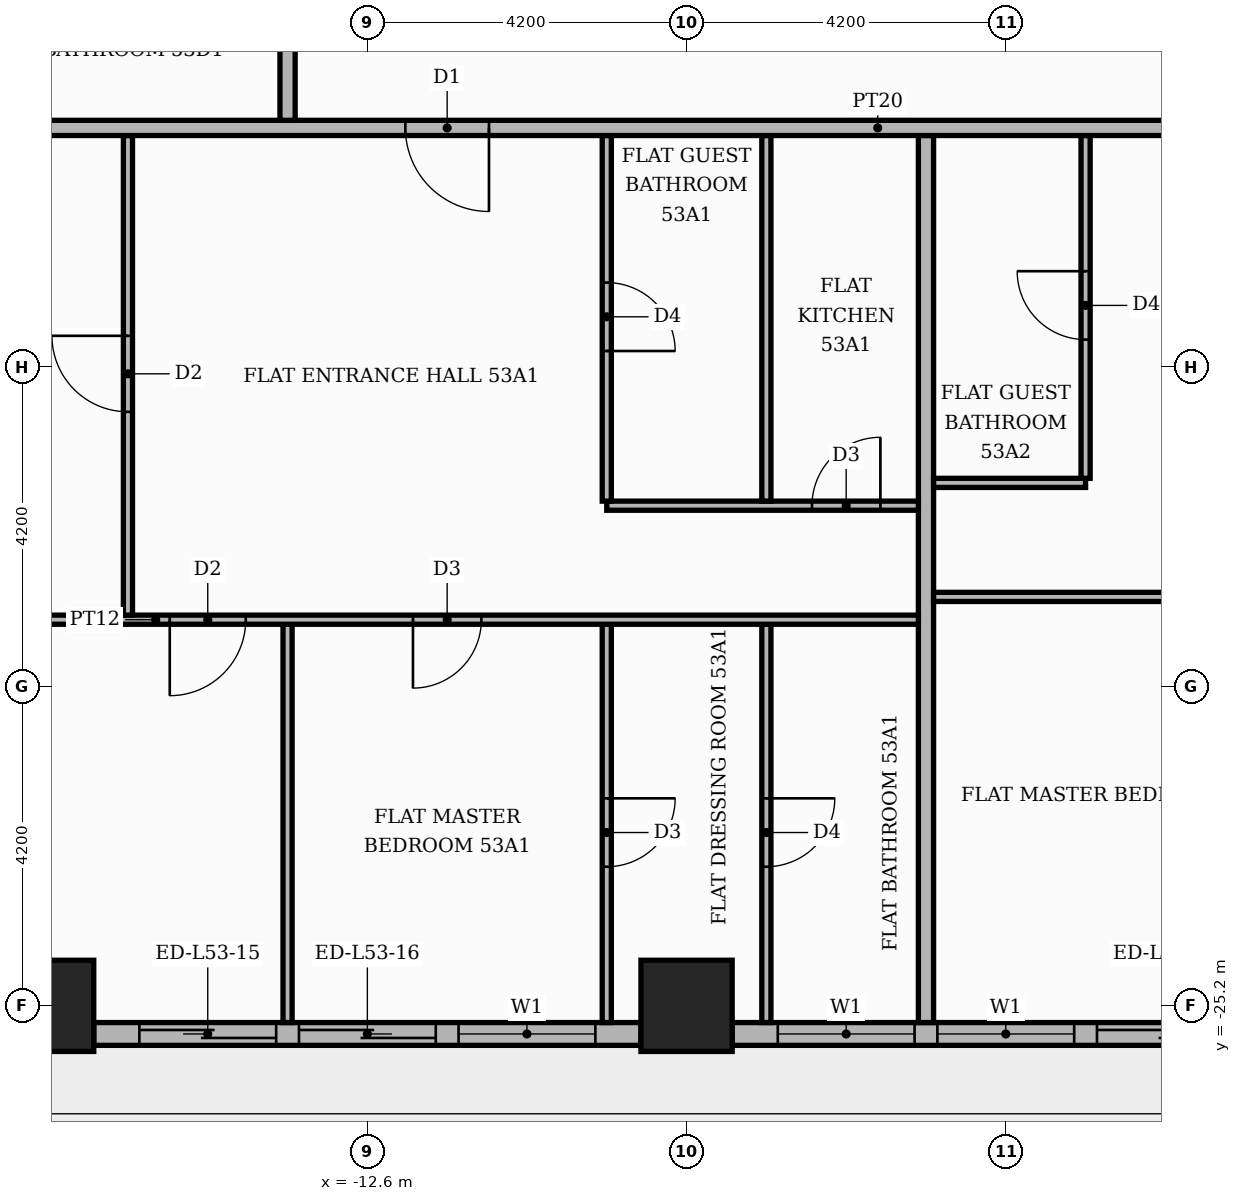
"""IFC4 building model, lengths in metres.
Left out: names, types, materials, properties, quantities, classifications, styles, units other than length and angle.
Written with IfcOpenShell. Run it as: python <this file> out.ifc"""

import sys

from ifc_helpers import new_model, si_unit, direction, frame, frame_2d, origin, origin_2d, place, context, subcontext, project, spatial, rectangle, extrude, element, fill, save


model = new_model("IFC4")
c1 = context("Model", 3, precision=1e-05, world=origin(), true_north=direction((0.0, 1.0)))
c2 = subcontext(c1, "Body", "Model", "MODEL_VIEW")
j1 = project(units=[si_unit("LENGTHUNIT", "METRE"), si_unit("PLANEANGLEUNIT", "RADIAN")], contexts=[c1])
p1 = place(None, origin())
s1 = spatial("IfcSite", under=j1, at=p1, CompositionType="ELEMENT")
p2 = place(p1, origin())
s2 = spatial("IfcBuilding", under=s1, at=p2, CompositionType="ELEMENT")
p3 = place(p2, frame((0.0, 0.0, 223.5)))
s3 = spatial("IfcBuildingStorey", under=s2, at=p3, CompositionType="ELEMENT", Elevation=223.5)
for number, where, z_axis, x_axis in (
    (1, (-8.4, -25.2, 0.0), (0.0, 0.0, 1.0), (1.0, 0.0, 0.0)),
    (2, (-16.8, -25.2, 0.0), (0.0, 0.0, 1.0), (1.0, 0.0, 0.0)),
):
    element("IfcColumn", number, at=place(p3, frame(where, z_axis=z_axis, x_axis=x_axis)), inside=s3, PredefinedType="COLUMN", context=c2, shape_type="SweptSolid", body=[
        extrude(rectangle(XDim=1.2, YDim=1.2, at=origin_2d()), origin(), (0.0, 0.0, 1.0), 3.9),
    ])
p4 = place(p3, frame((-16.2, -25.57, 0.0), z_axis=(0.0, 0.0, 1.0), x_axis=(1.0, 0.0, 0.0)))
e3 = element("IfcWall", 3, at=p4, inside=s3, PredefinedType="STANDARD", context=c2, shape_type="SweptSolid", body=[
    extrude(rectangle(XDim=7.2, YDim=0.3, at=frame_2d((3.6, 0.0))), origin(), (0.0, 0.0, 1.0), 3.48),
])
p5 = place(p4, frame((0.6, 0.0, 0.0)))
e4 = element("IfcOpeningElement", 4, at=p5, cuts=e3, PredefinedType="OPENING", context=c2, shape_type="SweptSolid", body=[
    extrude(rectangle(XDim=1.8, YDim=2.4, at=frame_2d((0.9, 1.2))), frame((0.0, 0.16, 0.0), z_axis=(0.0, -1.0, 0.0), x_axis=(1.0, 0.0, 0.0)), (0.0, 0.0, 1.0), 0.32),
])
p6 = place(p4, frame((2.7, 0.0, 0.0)))
e5 = element("IfcOpeningElement", 5, at=p6, cuts=e3, PredefinedType="OPENING", context=c2, shape_type="SweptSolid", body=[
    extrude(rectangle(XDim=1.8, YDim=2.4, at=frame_2d((0.9, 1.2))), frame((0.0, 0.16, 0.0), z_axis=(0.0, -1.0, 0.0), x_axis=(1.0, 0.0, 0.0)), (0.0, 0.0, 1.0), 0.32),
])
p7 = place(p4, frame((4.8, 0.0, 0.9)))
e6 = element("IfcOpeningElement", 6, at=p7, cuts=e3, PredefinedType="OPENING", context=c2, shape_type="SweptSolid", body=[
    extrude(rectangle(XDim=1.8, YDim=2.1, at=frame_2d((0.9, 1.05))), frame((0.0, 0.16, 0.0), z_axis=(0.0, -1.0, 0.0), x_axis=(1.0, 0.0, 0.0)), (0.0, 0.0, 1.0), 0.32),
])
p8 = place(p3, frame((-7.8, -25.57, 0.0), z_axis=(0.0, 0.0, 1.0), x_axis=(1.0, 0.0, 0.0)))
e7 = element("IfcWall", 7, at=p8, inside=s3, PredefinedType="STANDARD", context=c2, shape_type="SweptSolid", body=[
    extrude(rectangle(XDim=7.2, YDim=0.3, at=frame_2d((3.6, 0.0))), origin(), (0.0, 0.0, 1.0), 3.48),
])
p9 = place(p8, frame((0.6, 0.0, 0.9)))
e8 = element("IfcOpeningElement", 8, at=p9, cuts=e7, PredefinedType="OPENING", context=c2, shape_type="SweptSolid", body=[
    extrude(rectangle(XDim=1.8, YDim=2.1, at=frame_2d((0.9, 1.05))), frame((0.0, 0.16, 0.0), z_axis=(0.0, -1.0, 0.0), x_axis=(1.0, 0.0, 0.0)), (0.0, 0.0, 1.0), 0.32),
])
p10 = place(p8, frame((2.7, 0.0, 0.9)))
e9 = element("IfcOpeningElement", 9, at=p10, cuts=e7, PredefinedType="OPENING", context=c2, shape_type="SweptSolid", body=[
    extrude(rectangle(XDim=1.8, YDim=2.1, at=frame_2d((0.9, 1.05))), frame((0.0, 0.16, 0.0), z_axis=(0.0, -1.0, 0.0), x_axis=(1.0, 0.0, 0.0)), (0.0, 0.0, 1.0), 0.32),
])
p11 = place(p8, frame((4.8, 0.0, 0.0)))
e10 = element("IfcOpeningElement", 10, at=p11, cuts=e7, PredefinedType="OPENING", context=c2, shape_type="SweptSolid", body=[
    extrude(rectangle(XDim=1.8, YDim=2.4, at=frame_2d((0.9, 1.2))), frame((0.0, 0.16, 0.0), z_axis=(0.0, -1.0, 0.0), x_axis=(1.0, 0.0, 0.0)), (0.0, 0.0, 1.0), 0.32),
])
p12 = place(p3, frame((-13.65, -25.42, 0.0), z_axis=(0.0, 0.0, 1.0), x_axis=(0.0, 1.0, 0.0)))
e11 = element("IfcWall", 11, at=p12, inside=s3, PredefinedType="PARTITIONING", context=c2, shape_type="SweptSolid", body=[
    extrude(rectangle(XDim=5.24, YDim=0.12, at=frame_2d((2.62, 0.0))), origin(), (0.0, 0.0, 1.0), 3.48),
])
p13 = place(p3, frame((-9.45, -25.42, 0.0), z_axis=(0.0, 0.0, 1.0), x_axis=(0.0, 1.0, 0.0)))
e12 = element("IfcWall", 12, at=p13, inside=s3, PredefinedType="PARTITIONING", context=c2, shape_type="SweptSolid", body=[
    extrude(rectangle(XDim=5.24, YDim=0.12, at=frame_2d((2.62, 0.0))), origin(), (0.0, 0.0, 1.0), 3.48),
])
p14 = place(p13, frame((2.05, 0.0, 0.0)))
e13 = element("IfcOpeningElement", 13, at=p14, cuts=e12, PredefinedType="OPENING", context=c2, shape_type="SweptSolid", body=[
    extrude(rectangle(XDim=0.9, YDim=2.1, at=frame_2d((0.45, 1.05))), frame((0.0, 0.07, 0.0), z_axis=(0.0, -1.0, 0.0), x_axis=(1.0, 0.0, 0.0)), (0.0, 0.0, 1.0), 0.14),
])
p15 = place(p3, frame((-7.35, -25.42, 0.0), z_axis=(0.0, 0.0, 1.0), x_axis=(0.0, 1.0, 0.0)))
e14 = element("IfcWall", 14, at=p15, inside=s3, PredefinedType="PARTITIONING", context=c2, shape_type="SweptSolid", body=[
    extrude(rectangle(XDim=5.24, YDim=0.12, at=frame_2d((2.62, 0.0))), origin(), (0.0, 0.0, 1.0), 3.48),
])
p16 = place(p15, frame((2.05, 0.0, 0.0)))
e15 = element("IfcOpeningElement", 15, at=p16, cuts=e14, PredefinedType="OPENING", context=c2, shape_type="SweptSolid", body=[
    extrude(rectangle(XDim=0.9, YDim=2.1, at=frame_2d((0.45, 1.05))), frame((0.0, 0.07, 0.0), z_axis=(0.0, -1.0, 0.0), x_axis=(1.0, 0.0, 0.0)), (0.0, 0.0, 1.0), 0.14),
])
p17 = place(p3, frame((-5.25, -25.42, 0.0), z_axis=(0.0, 0.0, 1.0), x_axis=(0.0, 1.0, 0.0)))
e16 = element("IfcWall", 16, at=p17, inside=s3, PredefinedType="PARTITIONING", context=c2, shape_type="SweptSolid", body=[
    extrude(rectangle(XDim=11.67, YDim=0.2, at=frame_2d((5.835, 0.0))), origin(), (0.0, 0.0, 1.0), 3.48),
])
p18 = place(p3, frame((-25.42, -20.12, 0.0), z_axis=(0.0, 0.0, 1.0), x_axis=(1.0, 0.0, 0.0)))
e17 = element("IfcWall", 17, at=p18, inside=s3, PredefinedType="PARTITIONING", context=c2, shape_type="SweptSolid", body=[
    extrude(rectangle(XDim=20.07, YDim=0.12, at=frame_2d((10.035, 0.0))), origin(), (0.0, 0.0, 1.0), 3.48),
])
p19 = place(p18, frame((10.22, 0.0, 0.0)))
e18 = element("IfcOpeningElement", 18, at=p19, cuts=e17, PredefinedType="OPENING", context=c2, shape_type="SweptSolid", body=[
    extrude(rectangle(XDim=1.0, YDim=2.1, at=frame_2d((0.5, 1.05))), frame((0.0, 0.07, 0.0), z_axis=(0.0, -1.0, 0.0), x_axis=(1.0, 0.0, 0.0)), (0.0, 0.0, 1.0), 0.14),
])
p20 = place(p18, frame((13.42, 0.0, 0.0)))
e19 = element("IfcOpeningElement", 19, at=p20, cuts=e17, PredefinedType="OPENING", context=c2, shape_type="SweptSolid", body=[
    extrude(rectangle(XDim=0.9, YDim=2.1, at=frame_2d((0.45, 1.05))), frame((0.0, 0.07, 0.0), z_axis=(0.0, -1.0, 0.0), x_axis=(1.0, 0.0, 0.0)), (0.0, 0.0, 1.0), 0.14),
])
p21 = place(p3, frame((-15.75, -20.06, 0.0), z_axis=(0.0, 0.0, 1.0), x_axis=(0.0, 1.0, 0.0)))
e20 = element("IfcWall", 20, at=p21, inside=s3, PredefinedType="PARTITIONING", context=c2, shape_type="SweptSolid", body=[
    extrude(rectangle(XDim=6.31, YDim=0.12, at=frame_2d((3.155, 0.0))), origin(), (0.0, 0.0, 1.0), 3.48),
])
p22 = place(p21, frame((2.675, 0.0, 0.0)))
e21 = element("IfcOpeningElement", 21, at=p22, cuts=e20, PredefinedType="OPENING", context=c2, shape_type="SweptSolid", body=[
    extrude(rectangle(XDim=1.0, YDim=2.1, at=frame_2d((0.5, 1.05))), frame((0.0, 0.07, 0.0), z_axis=(0.0, -1.0, 0.0), x_axis=(1.0, 0.0, 0.0)), (0.0, 0.0, 1.0), 0.14),
])
p23 = place(p3, frame((-5.15, -19.82, 0.0), z_axis=(0.0, 0.0, 1.0), x_axis=(1.0, 0.0, 0.0)))
e22 = element("IfcWall", 22, at=p23, inside=s3, PredefinedType="PARTITIONING", context=c2, shape_type="SweptSolid", body=[
    extrude(rectangle(XDim=18.7, YDim=0.12, at=frame_2d((9.35, 0.0))), origin(), (0.0, 0.0, 1.0), 3.48),
])
p24 = place(p23, frame((3.65, 0.0, 0.0)))
e23 = element("IfcOpeningElement", 23, at=p24, cuts=e22, PredefinedType="OPENING", context=c2, shape_type="SweptSolid", body=[
    extrude(rectangle(XDim=0.9, YDim=2.1, at=frame_2d((0.45, 1.05))), frame((0.0, 0.07, 0.0), z_axis=(0.0, -1.0, 0.0), x_axis=(1.0, 0.0, 0.0)), (0.0, 0.0, 1.0), 0.14),
])
p25 = place(p23, frame((15.15, 0.0, 0.0)))
e24 = element("IfcOpeningElement", 24, at=p25, cuts=e22, PredefinedType="OPENING", context=c2, shape_type="SweptSolid", body=[
    extrude(rectangle(XDim=1.0, YDim=2.1, at=frame_2d((0.5, 1.05))), frame((0.0, 0.07, 0.0), z_axis=(0.0, -1.0, 0.0), x_axis=(1.0, 0.0, 0.0)), (0.0, 0.0, 1.0), 0.14),
])
p26 = place(p3, frame((-9.45, -18.62, 0.0), z_axis=(0.0, 0.0, 1.0), x_axis=(1.0, 0.0, 0.0)))
e25 = element("IfcWall", 25, at=p26, inside=s3, PredefinedType="PARTITIONING", context=c2, shape_type="SweptSolid", body=[
    extrude(rectangle(XDim=4.1, YDim=0.12, at=frame_2d((2.05, 0.0))), origin(), (0.0, 0.0, 1.0), 3.48),
])
p27 = place(p26, frame((2.7, 0.0, 0.0)))
e26 = element("IfcOpeningElement", 26, at=p27, cuts=e25, PredefinedType="OPENING", context=c2, shape_type="SweptSolid", body=[
    extrude(rectangle(XDim=0.9, YDim=2.1, at=frame_2d((0.45, 1.05))), frame((0.0, 0.07, 0.0), z_axis=(0.0, -1.0, 0.0), x_axis=(1.0, 0.0, 0.0)), (0.0, 0.0, 1.0), 0.14),
])
p28 = place(p3, frame((-9.45, -18.56, 0.0), z_axis=(0.0, 0.0, 1.0), x_axis=(0.0, 1.0, 0.0)))
e27 = element("IfcWall", 27, at=p28, inside=s3, PredefinedType="PARTITIONING", context=c2, shape_type="SweptSolid", body=[
    extrude(rectangle(XDim=4.81, YDim=0.12, at=frame_2d((2.405, 0.0))), origin(), (0.0, 0.0, 1.0), 3.48),
])
p29 = place(p28, frame((1.975, 0.0, 0.0)))
e28 = element("IfcOpeningElement", 28, at=p29, cuts=e27, PredefinedType="OPENING", context=c2, shape_type="SweptSolid", body=[
    extrude(rectangle(XDim=0.9, YDim=2.1, at=frame_2d((0.45, 1.05))), frame((0.0, 0.07, 0.0), z_axis=(0.0, -1.0, 0.0), x_axis=(1.0, 0.0, 0.0)), (0.0, 0.0, 1.0), 0.14),
])
p30 = place(p3, frame((-7.35, -18.56, 0.0), z_axis=(0.0, 0.0, 1.0), x_axis=(0.0, 1.0, 0.0)))
e29 = element("IfcWall", 29, at=p30, inside=s3, PredefinedType="PARTITIONING", context=c2, shape_type="SweptSolid", body=[
    extrude(rectangle(XDim=4.81, YDim=0.12, at=frame_2d((2.405, 0.0))), origin(), (0.0, 0.0, 1.0), 3.48),
])
p31 = place(p3, frame((-5.15, -18.32, 0.0), z_axis=(0.0, 0.0, 1.0), x_axis=(1.0, 0.0, 0.0)))
e30 = element("IfcWall", 30, at=p31, inside=s3, PredefinedType="PARTITIONING", context=c2, shape_type="SweptSolid", body=[
    extrude(rectangle(XDim=2.0, YDim=0.12, at=frame_2d((1.0, 0.0))), origin(), (0.0, 0.0, 1.0), 3.48),
])
p32 = place(p3, frame((-3.15, -18.26, 0.0), z_axis=(0.0, 0.0, 1.0), x_axis=(0.0, 1.0, 0.0)))
e31 = element("IfcWall", 31, at=p32, inside=s3, PredefinedType="PARTITIONING", context=c2, shape_type="SweptSolid", body=[
    extrude(rectangle(XDim=4.51, YDim=0.12, at=frame_2d((2.255, 0.0))), origin(), (0.0, 0.0, 1.0), 3.48),
])
p33 = place(p32, frame((1.825, 0.0, 0.0)))
e32 = element("IfcOpeningElement", 32, at=p33, cuts=e31, PredefinedType="OPENING", context=c2, shape_type="SweptSolid", body=[
    extrude(rectangle(XDim=0.9, YDim=2.1, at=frame_2d((0.45, 1.05))), frame((0.0, 0.07, 0.0), z_axis=(0.0, -1.0, 0.0), x_axis=(1.0, 0.0, 0.0)), (0.0, 0.0, 1.0), 0.14),
])
p34 = place(p3, frame((-25.42, -13.65, 0.0), z_axis=(0.0, 0.0, 1.0), x_axis=(1.0, 0.0, 0.0)))
e33 = element("IfcWall", 33, at=p34, inside=s3, PredefinedType="PARTITIONING", context=c2, shape_type="SweptSolid", body=[
    extrude(rectangle(XDim=39.07, YDim=0.2, at=frame_2d((19.535, 0.0))), origin(), (0.0, 0.0, 1.0), 3.48),
])
p35 = place(p34, frame((13.32, 0.0, 0.0)))
e34 = element("IfcOpeningElement", 34, at=p35, cuts=e33, PredefinedType="OPENING", context=c2, shape_type="SweptSolid", body=[
    extrude(rectangle(XDim=1.1, YDim=2.4, at=frame_2d((0.55, 1.2))), frame((0.0, 0.11, 0.0), z_axis=(0.0, -1.0, 0.0), x_axis=(1.0, 0.0, 0.0)), (0.0, 0.0, 1.0), 0.22),
])
p36 = place(p34, frame((23.82, 0.0, 0.0)))
e35 = element("IfcOpeningElement", 35, at=p36, cuts=e33, PredefinedType="OPENING", context=c2, shape_type="SweptSolid", body=[
    extrude(rectangle(XDim=1.1, YDim=2.4, at=frame_2d((0.55, 1.2))), frame((0.0, 0.11, 0.0), z_axis=(0.0, -1.0, 0.0), x_axis=(1.0, 0.0, 0.0)), (0.0, 0.0, 1.0), 0.22),
])
p37 = place(p3, frame((-13.65, -13.55, 0.0), z_axis=(0.0, 0.0, 1.0), x_axis=(0.0, 1.0, 0.0)))
e36 = element("IfcWall", 36, at=p37, inside=s3, PredefinedType="PARTITIONING", context=c2, shape_type="SweptSolid", body=[
    extrude(rectangle(XDim=27.1, YDim=0.2, at=frame_2d((13.55, 0.0))), origin(), (0.0, 0.0, 1.0), 3.48),
])
p38 = place(p37, frame((23.5, 0.0, 0.0)))
e37 = element("IfcOpeningElement", 37, at=p38, cuts=e36, PredefinedType="OPENING", context=c2, shape_type="SweptSolid", body=[
    extrude(rectangle(XDim=1.1, YDim=2.4, at=frame_2d((0.55, 1.2))), frame((0.0, 0.11, 0.0), z_axis=(0.0, -1.0, 0.0), x_axis=(1.0, 0.0, 0.0)), (0.0, 0.0, 1.0), 0.22),
])
p39 = place(p5, origin())
e38 = element("IfcDoor", 38, at=p39, inside=s3, OperationType="SLIDING_TO_LEFT", PredefinedType="DOOR", context=c2, shape_type="SweptSolid", body=[
    extrude(rectangle(XDim=1.8, YDim=2.4, at=frame_2d((0.9, 1.2))), frame((0.0, 0.025, 0.0), z_axis=(0.0, -1.0, 0.0), x_axis=(1.0, 0.0, 0.0)), (0.0, 0.0, 1.0), 0.05),
])
fill(e4, e38)
p40 = place(p6, origin())
e39 = element("IfcDoor", 39, at=p40, inside=s3, OperationType="SLIDING_TO_RIGHT", PredefinedType="DOOR", context=c2, shape_type="SweptSolid", body=[
    extrude(rectangle(XDim=1.8, YDim=2.4, at=frame_2d((0.9, 1.2))), frame((0.0, 0.025, 0.0), z_axis=(0.0, -1.0, 0.0), x_axis=(1.0, 0.0, 0.0)), (0.0, 0.0, 1.0), 0.05),
])
fill(e5, e39)
p41 = place(p7, origin())
e40 = element("IfcWindow", 40, at=p41, inside=s3, PartitioningType="SINGLE_PANEL", PredefinedType="WINDOW", context=c2, shape_type="SweptSolid", body=[
    extrude(rectangle(XDim=1.8, YDim=2.1, at=frame_2d((0.9, 1.05))), frame((0.0, 0.03, 0.0), z_axis=(0.0, -1.0, 0.0), x_axis=(1.0, 0.0, 0.0)), (0.0, 0.0, 1.0), 0.06),
])
fill(e6, e40)
p42 = place(p9, origin())
e41 = element("IfcWindow", 41, at=p42, inside=s3, PartitioningType="SINGLE_PANEL", PredefinedType="WINDOW", context=c2, shape_type="SweptSolid", body=[
    extrude(rectangle(XDim=1.8, YDim=2.1, at=frame_2d((0.9, 1.05))), frame((0.0, 0.03, 0.0), z_axis=(0.0, -1.0, 0.0), x_axis=(1.0, 0.0, 0.0)), (0.0, 0.0, 1.0), 0.06),
])
fill(e8, e41)
p43 = place(p10, origin())
e42 = element("IfcWindow", 42, at=p43, inside=s3, PartitioningType="SINGLE_PANEL", PredefinedType="WINDOW", context=c2, shape_type="SweptSolid", body=[
    extrude(rectangle(XDim=1.8, YDim=2.1, at=frame_2d((0.9, 1.05))), frame((0.0, 0.03, 0.0), z_axis=(0.0, -1.0, 0.0), x_axis=(1.0, 0.0, 0.0)), (0.0, 0.0, 1.0), 0.06),
])
fill(e9, e42)
p44 = place(p11, origin())
e43 = element("IfcDoor", 43, at=p44, inside=s3, OperationType="SLIDING_TO_RIGHT", PredefinedType="DOOR", context=c2, shape_type="SweptSolid", body=[
    extrude(rectangle(XDim=1.8, YDim=2.4, at=frame_2d((0.9, 1.2))), frame((0.0, 0.025, 0.0), z_axis=(0.0, -1.0, 0.0), x_axis=(1.0, 0.0, 0.0)), (0.0, 0.0, 1.0), 0.05),
])
fill(e10, e43)
p45 = place(p35, frame((1.1, 0.0, 0.0), z_axis=(0.0, 0.0, 1.0), x_axis=(-1.0, 0.0, 0.0)))
e44 = element("IfcDoor", 44, at=p45, inside=s3, OperationType="SINGLE_SWING_RIGHT", PredefinedType="DOOR", context=c2, shape_type="SweptSolid", body=[
    extrude(rectangle(XDim=1.1, YDim=2.4, at=frame_2d((0.55, 1.2))), frame((0.0, 0.025, 0.0), z_axis=(0.0, -1.0, 0.0), x_axis=(1.0, 0.0, 0.0)), (0.0, 0.0, 1.0), 0.05),
])
fill(e34, e44)
p46 = place(p22, origin())
e45 = element("IfcDoor", 45, at=p46, inside=s3, OperationType="SINGLE_SWING_RIGHT", PredefinedType="DOOR", context=c2, shape_type="SweptSolid", body=[
    extrude(rectangle(XDim=1.0, YDim=2.1, at=frame_2d((0.5, 1.05))), frame((0.0, 0.025, 0.0), z_axis=(0.0, -1.0, 0.0), x_axis=(1.0, 0.0, 0.0)), (0.0, 0.0, 1.0), 0.05),
])
fill(e21, e45)
p47 = place(p29, frame((0.9, 0.0, 0.0), z_axis=(0.0, 0.0, 1.0), x_axis=(-1.0, 0.0, 0.0)))
e46 = element("IfcDoor", 46, at=p47, inside=s3, OperationType="SINGLE_SWING_LEFT", PredefinedType="DOOR", context=c2, shape_type="SweptSolid", body=[
    extrude(rectangle(XDim=0.9, YDim=2.1, at=frame_2d((0.45, 1.05))), frame((0.0, 0.025, 0.0), z_axis=(0.0, -1.0, 0.0), x_axis=(1.0, 0.0, 0.0)), (0.0, 0.0, 1.0), 0.05),
])
fill(e28, e46)
p48 = place(p27, origin())
e47 = element("IfcDoor", 47, at=p48, inside=s3, OperationType="SINGLE_SWING_RIGHT", PredefinedType="DOOR", context=c2, shape_type="SweptSolid", body=[
    extrude(rectangle(XDim=0.9, YDim=2.1, at=frame_2d((0.45, 1.05))), frame((0.0, 0.025, 0.0), z_axis=(0.0, -1.0, 0.0), x_axis=(1.0, 0.0, 0.0)), (0.0, 0.0, 1.0), 0.05),
])
fill(e26, e47)
p49 = place(p19, frame((1.0, 0.0, 0.0), z_axis=(0.0, 0.0, 1.0), x_axis=(-1.0, 0.0, 0.0)))
e48 = element("IfcDoor", 48, at=p49, inside=s3, OperationType="SINGLE_SWING_LEFT", PredefinedType="DOOR", context=c2, shape_type="SweptSolid", body=[
    extrude(rectangle(XDim=1.0, YDim=2.1, at=frame_2d((0.5, 1.05))), frame((0.0, 0.025, 0.0), z_axis=(0.0, -1.0, 0.0), x_axis=(1.0, 0.0, 0.0)), (0.0, 0.0, 1.0), 0.05),
])
fill(e18, e48)
p50 = place(p20, frame((0.9, 0.0, 0.0), z_axis=(0.0, 0.0, 1.0), x_axis=(-1.0, 0.0, 0.0)))
e49 = element("IfcDoor", 49, at=p50, inside=s3, OperationType="SINGLE_SWING_LEFT", PredefinedType="DOOR", context=c2, shape_type="SweptSolid", body=[
    extrude(rectangle(XDim=0.9, YDim=2.1, at=frame_2d((0.45, 1.05))), frame((0.0, 0.025, 0.0), z_axis=(0.0, -1.0, 0.0), x_axis=(1.0, 0.0, 0.0)), (0.0, 0.0, 1.0), 0.05),
])
fill(e19, e49)
p51 = place(p14, frame((0.9, 0.0, 0.0), z_axis=(0.0, 0.0, 1.0), x_axis=(-1.0, 0.0, 0.0)))
e50 = element("IfcDoor", 50, at=p51, inside=s3, OperationType="SINGLE_SWING_RIGHT", PredefinedType="DOOR", context=c2, shape_type="SweptSolid", body=[
    extrude(rectangle(XDim=0.9, YDim=2.1, at=frame_2d((0.45, 1.05))), frame((0.0, 0.025, 0.0), z_axis=(0.0, -1.0, 0.0), x_axis=(1.0, 0.0, 0.0)), (0.0, 0.0, 1.0), 0.05),
])
fill(e13, e50)
p52 = place(p16, frame((0.9, 0.0, 0.0), z_axis=(0.0, 0.0, 1.0), x_axis=(-1.0, 0.0, 0.0)))
e51 = element("IfcDoor", 51, at=p52, inside=s3, OperationType="SINGLE_SWING_RIGHT", PredefinedType="DOOR", context=c2, shape_type="SweptSolid", body=[
    extrude(rectangle(XDim=0.9, YDim=2.1, at=frame_2d((0.45, 1.05))), frame((0.0, 0.025, 0.0), z_axis=(0.0, -1.0, 0.0), x_axis=(1.0, 0.0, 0.0)), (0.0, 0.0, 1.0), 0.05),
])
fill(e15, e51)
p53 = place(p33, origin())
e52 = element("IfcDoor", 52, at=p53, inside=s3, OperationType="SINGLE_SWING_RIGHT", PredefinedType="DOOR", context=c2, shape_type="SweptSolid", body=[
    extrude(rectangle(XDim=0.9, YDim=2.1, at=frame_2d((0.45, 1.05))), frame((0.0, 0.025, 0.0), z_axis=(0.0, -1.0, 0.0), x_axis=(1.0, 0.0, 0.0)), (0.0, 0.0, 1.0), 0.05),
])
fill(e32, e52)
save(model, sys.argv[1])
